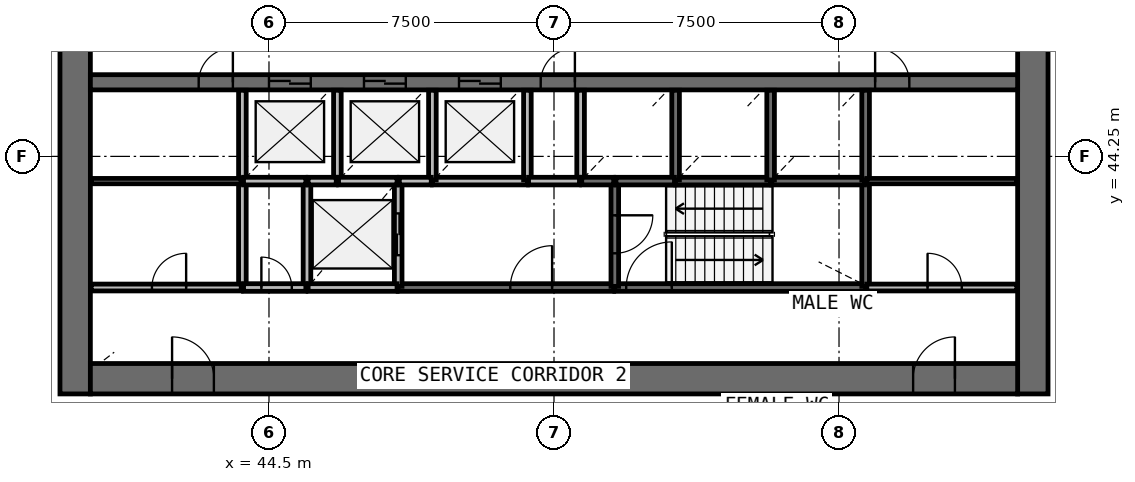
"""IFC4 building model, lengths in metres.
Left out: names, types, materials, properties, quantities, classifications, styles, units other than length and angle.
Written with IfcOpenShell. Run it as: python <this file> out.ifc"""

import sys

from ifc_helpers import new_model, si_unit, direction, frame, frame_2d, origin, place, context, subcontext, project, spatial, rectangle, extrude, source, transform, mapped, element, fill, save


model = new_model("IFC4")
c1 = context("Model", 3, precision=1e-05, world=origin(), true_north=direction((0.0, 1.0)))
c2 = subcontext(c1, "Body", "Model", "MODEL_VIEW")
j1 = project(units=[si_unit("LENGTHUNIT", "METRE"), si_unit("PLANEANGLEUNIT", "RADIAN")], contexts=[c1])
p1 = place(None, origin())
s1 = spatial("IfcSite", under=j1, at=p1, CompositionType="ELEMENT")
p2 = place(p1, origin())
s2 = spatial("IfcBuilding", under=s1, at=p2, CompositionType="ELEMENT")
p3 = place(p2, frame((0.0, 0.0, 108.5)))
s3 = spatial("IfcBuildingStorey", under=s2, at=p3, CompositionType="ELEMENT", Elevation=108.5)
p4 = place(p3, frame((64.6, 38.0, 0.0), z_axis=(0.0, 0.0, 1.0), x_axis=(0.0, 1.0, 0.0)))
e1 = element("IfcWall", 1, at=p4, inside=s3, PredefinedType="SHEAR", context=c2, shape_type="SweptSolid", body=[
    extrude(rectangle(XDim=20.0, YDim=0.8, at=frame_2d((10.0, 0.0))), origin(), (0.0, 0.0, 1.0), 4.1),
])
p5 = place(p4, frame((9.1, 0.0, 0.0)))
e2 = element("IfcOpeningElement", 2, at=p5, cuts=e1, PredefinedType="OPENING", context=c2, shape_type="SweptSolid", body=[
    extrude(rectangle(XDim=1.8, YDim=2.1, at=frame_2d((0.9, 1.05))), frame((0.0, 0.41, 0.0), z_axis=(0.0, -1.0, 0.0), x_axis=(1.0, 0.0, 0.0)), (0.0, 0.0, 1.0), 0.82),
])
p6 = place(p3, frame((39.4, 58.0, 0.0), z_axis=(0.0, 0.0, 1.0), x_axis=(0.0, -1.0, 0.0)))
e3 = element("IfcWall", 3, at=p6, inside=s3, PredefinedType="SHEAR", context=c2, shape_type="SweptSolid", body=[
    extrude(rectangle(XDim=20.0, YDim=0.8, at=frame_2d((10.0, 0.0))), origin(), (0.0, 0.0, 1.0), 4.1),
])
p7 = place(p6, frame((9.1, 0.0, 0.0)))
e4 = element("IfcOpeningElement", 4, at=p7, cuts=e3, PredefinedType="OPENING", context=c2, shape_type="SweptSolid", body=[
    extrude(rectangle(XDim=1.8, YDim=2.1, at=frame_2d((0.9, 1.05))), frame((0.0, 0.41, 0.0), z_axis=(0.0, -1.0, 0.0), x_axis=(1.0, 0.0, 0.0)), (0.0, 0.0, 1.0), 0.82),
])
p8 = place(p3, frame((39.8, 38.4, 0.0), z_axis=(0.0, 0.0, 1.0), x_axis=(1.0, 0.0, 0.0)))
e5 = element("IfcWall", 5, at=p8, inside=s3, PredefinedType="SHEAR", context=c2, shape_type="SweptSolid", body=[
    extrude(rectangle(XDim=24.4, YDim=0.8, at=frame_2d((12.2, 0.0))), origin(), (0.0, 0.0, 1.0), 4.1),
])
p9 = place(p8, frame((21.65, 0.0, 0.0)))
e6 = element("IfcOpeningElement", 6, at=p9, cuts=e5, PredefinedType="OPENING", context=c2, shape_type="SweptSolid", body=[
    extrude(rectangle(XDim=1.1, YDim=2.1, at=frame_2d((0.55, 1.05))), frame((0.0, 0.41, 0.0), z_axis=(0.0, -1.0, 0.0), x_axis=(1.0, 0.0, 0.0)), (0.0, 0.0, 1.0), 0.82),
])
p10 = place(p8, frame((2.15, 0.0, 0.0)))
e7 = element("IfcOpeningElement", 7, at=p10, cuts=e5, PredefinedType="OPENING", context=c2, shape_type="SweptSolid", body=[
    extrude(rectangle(XDim=1.1, YDim=2.1, at=frame_2d((0.55, 1.05))), frame((0.0, 0.41, 0.0), z_axis=(0.0, -1.0, 0.0), x_axis=(1.0, 0.0, 0.0)), (0.0, 0.0, 1.0), 0.82),
])
p11 = place(p3, frame((39.8, 46.2, 0.0), z_axis=(0.0, 0.0, 1.0), x_axis=(1.0, 0.0, 0.0)))
e8 = element("IfcWall", 8, at=p11, inside=s3, PredefinedType="SHEAR", context=c2, shape_type="SweptSolid", body=[
    extrude(rectangle(XDim=24.4, YDim=0.4, at=frame_2d((12.2, 0.0))), origin(), (0.0, 0.0, 1.0), 4.1),
])
p12 = place(p11, frame((4.7, 0.0, 0.0)))
e9 = element("IfcOpeningElement", 9, at=p12, cuts=e8, PredefinedType="OPENING", context=c2, shape_type="SweptSolid", body=[
    extrude(rectangle(XDim=1.1, YDim=2.1, at=frame_2d((0.55, 1.05))), frame((0.0, 0.21, 0.0), z_axis=(0.0, -1.0, 0.0), x_axis=(1.0, 0.0, 0.0)), (0.0, 0.0, 1.0), 0.42),
])
p13 = place(p11, frame((7.2, 0.0, 0.0)))
e10 = element("IfcOpeningElement", 10, at=p13, cuts=e8, PredefinedType="OPENING", context=c2, shape_type="SweptSolid", body=[
    extrude(rectangle(XDim=1.1, YDim=2.1, at=frame_2d((0.55, 1.05))), frame((0.0, 0.21, 0.0), z_axis=(0.0, -1.0, 0.0), x_axis=(1.0, 0.0, 0.0)), (0.0, 0.0, 1.0), 0.42),
])
p14 = place(p11, frame((9.7, 0.0, 0.0)))
e11 = element("IfcOpeningElement", 11, at=p14, cuts=e8, PredefinedType="OPENING", context=c2, shape_type="SweptSolid", body=[
    extrude(rectangle(XDim=1.1, YDim=2.1, at=frame_2d((0.55, 1.05))), frame((0.0, 0.21, 0.0), z_axis=(0.0, -1.0, 0.0), x_axis=(1.0, 0.0, 0.0)), (0.0, 0.0, 1.0), 0.42),
])
p15 = place(p11, frame((20.65, 0.0, 0.0)))
e12 = element("IfcOpeningElement", 12, at=p15, cuts=e8, PredefinedType="OPENING", context=c2, shape_type="SweptSolid", body=[
    extrude(rectangle(XDim=0.9, YDim=2.1, at=frame_2d((0.45, 1.05))), frame((0.0, 0.21, 0.0), z_axis=(0.0, -1.0, 0.0), x_axis=(1.0, 0.0, 0.0)), (0.0, 0.0, 1.0), 0.42),
])
p16 = place(p11, frame((2.85, 0.0, 0.0)))
e13 = element("IfcOpeningElement", 13, at=p16, cuts=e8, PredefinedType="OPENING", context=c2, shape_type="SweptSolid", body=[
    extrude(rectangle(XDim=0.9, YDim=2.1, at=frame_2d((0.45, 1.05))), frame((0.0, 0.21, 0.0), z_axis=(0.0, -1.0, 0.0), x_axis=(1.0, 0.0, 0.0)), (0.0, 0.0, 1.0), 0.42),
])
p17 = place(p11, frame((11.85, 0.0, 0.0)))
e14 = element("IfcOpeningElement", 14, at=p17, cuts=e8, PredefinedType="OPENING", context=c2, shape_type="SweptSolid", body=[
    extrude(rectangle(XDim=0.9, YDim=2.1, at=frame_2d((0.45, 1.05))), frame((0.0, 0.21, 0.0), z_axis=(0.0, -1.0, 0.0), x_axis=(1.0, 0.0, 0.0)), (0.0, 0.0, 1.0), 0.42),
])
p18 = place(p3, frame((53.6, 40.8, 0.0), z_axis=(0.0, 0.0, 1.0), x_axis=(1.0, 0.0, 0.0)))
e15 = element("IfcWall", 15, at=p18, inside=s3, PredefinedType="SOLIDWALL", context=c2, shape_type="SweptSolid", body=[
    extrude(rectangle(XDim=6.6, YDim=0.2, at=frame_2d((3.3, 0.0))), origin(), (0.0, 0.0, 1.0), 3.7),
])
p19 = place(p18, frame((0.3, 0.0, 0.0)))
e16 = element("IfcOpeningElement", 16, at=p19, cuts=e15, PredefinedType="OPENING", context=c2, shape_type="SweptSolid", body=[
    extrude(rectangle(XDim=1.2, YDim=2.1, at=frame_2d((0.6, 1.05))), frame((0.0, 0.11, 0.0), z_axis=(0.0, -1.0, 0.0), x_axis=(1.0, 0.0, 0.0)), (0.0, 0.0, 1.0), 0.22),
])
p20 = place(p3, frame((47.9, 40.8, 0.0), z_axis=(0.0, 0.0, 1.0), x_axis=(1.0, 0.0, 0.0)))
e17 = element("IfcWall", 17, at=p20, inside=s3, PredefinedType="SOLIDWALL", context=c2, shape_type="SweptSolid", body=[
    extrude(rectangle(XDim=5.67, YDim=0.2, at=frame_2d((2.835, 0.0))), origin(), (0.0, 0.0, 1.0), 3.7),
])
p21 = place(p20, frame((2.95, 0.0, 0.0)))
e18 = element("IfcOpeningElement", 18, at=p21, cuts=e17, PredefinedType="OPENING", context=c2, shape_type="SweptSolid", body=[
    extrude(rectangle(XDim=1.1, YDim=2.1, at=frame_2d((0.55, 1.05))), frame((0.0, 0.11, 0.0), z_axis=(0.0, -1.0, 0.0), x_axis=(1.0, 0.0, 0.0)), (0.0, 0.0, 1.0), 0.22),
])
for number, where, z_axis, x_axis in (
    (19, (43.8, 43.6, 0.0), (0.0, 0.0, 1.0), (0.0, -1.0, 0.0)),
    (20, (45.5, 43.6, 0.0), (0.0, 0.0, 1.0), (0.0, -1.0, 0.0)),
):
    element("IfcWall", number, at=place(p3, frame(where, z_axis=z_axis, x_axis=x_axis)), inside=s3, PredefinedType="SOLIDWALL", context=c2, shape_type="SweptSolid", body=[
        extrude(rectangle(XDim=2.8, YDim=0.2, at=frame_2d((1.4, 0.0))), origin(), (0.0, 0.0, 1.0), 3.7),
    ])
p22 = place(p3, frame((47.9, 40.83, 0.0), z_axis=(0.0, 0.0, 1.0), x_axis=(0.0, 1.0, 0.0)))
e21 = element("IfcWall", 21, at=p22, inside=s3, PredefinedType="SOLIDWALL", context=c2, shape_type="SweptSolid", body=[
    extrude(rectangle(XDim=2.77, YDim=0.2, at=frame_2d((1.385, 0.0))), origin(), (0.0, 0.0, 1.0), 3.7),
])
p23 = place(p22, frame((0.82, 0.0, 0.0)))
e22 = element("IfcOpeningElement", 22, at=p23, cuts=e21, PredefinedType="OPENING", context=c2, shape_type="SweptSolid", body=[
    extrude(rectangle(XDim=1.1, YDim=2.1, at=frame_2d((0.55, 1.05))), frame((0.0, 0.11, 0.0), z_axis=(0.0, -1.0, 0.0), x_axis=(1.0, 0.0, 0.0)), (0.0, 0.0, 1.0), 0.22),
])
p24 = place(p3, frame((60.2, 40.83, 0.0), z_axis=(0.0, 0.0, 1.0), x_axis=(0.0, 1.0, 0.0)))
e23 = element("IfcWall", 23, at=p24, inside=s3, PredefinedType="SOLIDWALL", context=c2, shape_type="SweptSolid", body=[
    extrude(rectangle(XDim=2.77, YDim=0.2, at=frame_2d((1.385, 0.0))), origin(), (0.0, 0.0, 1.0), 3.7),
])
p25 = place(p3, frame((53.6, 43.6, 0.0), z_axis=(0.0, 0.0, 1.0), x_axis=(0.0, -1.0, 0.0)))
e24 = element("IfcWall", 24, at=p25, inside=s3, PredefinedType="SOLIDWALL", context=c2, shape_type="SweptSolid", body=[
    extrude(rectangle(XDim=2.77, YDim=0.2, at=frame_2d((1.385, 0.0))), origin(), (0.0, 0.0, 1.0), 3.7),
])
p26 = place(p25, frame((0.9, 0.0, 0.0)))
e25 = element("IfcOpeningElement", 25, at=p26, cuts=e24, PredefinedType="OPENING", context=c2, shape_type="SweptSolid", body=[
    extrude(rectangle(XDim=1.0, YDim=2.1, at=frame_2d((0.5, 1.05))), frame((0.0, 0.11, 0.0), z_axis=(0.0, -1.0, 0.0), x_axis=(1.0, 0.0, 0.0)), (0.0, 0.0, 1.0), 0.22),
])
for number, where, z_axis, x_axis in (
    (26, (48.8, 43.6, 0.0), (0.0, 0.0, 1.0), (1.0, 0.0, 0.0)),
    (27, (55.2, 43.6, 0.0), (0.0, 0.0, 1.0), (1.0, 0.0, 0.0)),
):
    element("IfcWall", number, at=place(p3, frame(where, z_axis=z_axis, x_axis=x_axis)), inside=s3, PredefinedType="SOLIDWALL", context=c2, shape_type="SweptSolid", body=[
        extrude(rectangle(XDim=2.5, YDim=0.2, at=frame_2d((1.25, 0.0))), origin(), (0.0, 0.0, 1.0), 3.7),
    ])
p27 = place(p3, frame((57.73, 43.6, 0.0), z_axis=(0.0, 0.0, 1.0), x_axis=(1.0, 0.0, 0.0)))
e28 = element("IfcWall", 28, at=p27, inside=s3, PredefinedType="SOLIDWALL", context=c2, shape_type="SweptSolid", body=[
    extrude(rectangle(XDim=2.44, YDim=0.2, at=frame_2d((1.22, 0.0))), origin(), (0.0, 0.0, 1.0), 3.7),
])
p28 = place(p3, frame((45.53, 40.8, 0.0), z_axis=(0.0, 0.0, 1.0), x_axis=(1.0, 0.0, 0.0)))
e29 = element("IfcWall", 29, at=p28, inside=s3, PredefinedType="SOLIDWALL", context=c2, shape_type="SweptSolid", body=[
    extrude(rectangle(XDim=2.34, YDim=0.2, at=frame_2d((1.17, 0.0))), origin(), (0.0, 0.0, 1.0), 3.7),
])
p29 = place(p3, frame((43.8, 45.99, 0.0), z_axis=(0.0, 0.0, 1.0), x_axis=(0.0, -1.0, 0.0)))
e30 = element("IfcWall", 30, at=p29, inside=s3, PredefinedType="SOLIDWALL", context=c2, shape_type="SweptSolid", body=[
    extrude(rectangle(XDim=2.36, YDim=0.2, at=frame_2d((1.18, 0.0))), origin(), (0.0, 0.0, 1.0), 3.7),
])
p30 = place(p3, frame((46.3, 43.6, 0.0), z_axis=(0.0, 0.0, 1.0), x_axis=(0.0, 1.0, 0.0)))
e31 = element("IfcWall", 31, at=p30, inside=s3, PredefinedType="SOLIDWALL", context=c2, shape_type="SweptSolid", body=[
    extrude(rectangle(XDim=2.39, YDim=0.2, at=frame_2d((1.195, 0.0))), origin(), (0.0, 0.0, 1.0), 3.7),
])
for number, where, z_axis, x_axis in (
    (32, (48.8, 43.63, 0.0), (0.0, 0.0, 1.0), (0.0, 1.0, 0.0)),
    (33, (51.3, 43.63, 0.0), (0.0, 0.0, 1.0), (0.0, 1.0, 0.0)),
):
    element("IfcWall", number, at=place(p3, frame(where, z_axis=z_axis, x_axis=x_axis)), inside=s3, PredefinedType="SOLIDWALL", context=c2, shape_type="SweptSolid", body=[
        extrude(rectangle(XDim=2.36, YDim=0.2, at=frame_2d((1.18, 0.0))), origin(), (0.0, 0.0, 1.0), 3.7),
    ])
p31 = place(p3, frame((52.7, 45.99, 0.0), z_axis=(0.0, 0.0, 1.0), x_axis=(0.0, -1.0, 0.0)))
e34 = element("IfcWall", 34, at=p31, inside=s3, PredefinedType="SOLIDWALL", context=c2, shape_type="SweptSolid", body=[
    extrude(rectangle(XDim=2.39, YDim=0.2, at=frame_2d((1.195, 0.0))), origin(), (0.0, 0.0, 1.0), 3.7),
])
for number, where, z_axis, x_axis in (
    (35, (55.2, 43.63, 0.0), (0.0, 0.0, 1.0), (0.0, 1.0, 0.0)),
    (36, (57.7, 43.63, 0.0), (0.0, 0.0, 1.0), (0.0, 1.0, 0.0)),
    (37, (60.2, 43.63, 0.0), (0.0, 0.0, 1.0), (0.0, 1.0, 0.0)),
):
    element("IfcWall", number, at=place(p3, frame(where, z_axis=z_axis, x_axis=x_axis)), inside=s3, PredefinedType="SOLIDWALL", context=c2, shape_type="SweptSolid", body=[
        extrude(rectangle(XDim=2.36, YDim=0.2, at=frame_2d((1.18, 0.0))), origin(), (0.0, 0.0, 1.0), 3.7),
    ])
p32 = place(p3, frame((43.83, 43.6, 0.0), z_axis=(0.0, 0.0, 1.0), x_axis=(1.0, 0.0, 0.0)))
e38 = element("IfcWall", 38, at=p32, inside=s3, PredefinedType="SOLIDWALL", context=c2, shape_type="SweptSolid", body=[
    extrude(rectangle(XDim=1.64, YDim=0.2, at=frame_2d((0.82, 0.0))), origin(), (0.0, 0.0, 1.0), 3.7),
])
p33 = place(p3, frame((43.83, 40.8, 0.0), z_axis=(0.0, 0.0, 1.0), x_axis=(1.0, 0.0, 0.0)))
e39 = element("IfcWall", 39, at=p33, inside=s3, PredefinedType="SOLIDWALL", context=c2, shape_type="SweptSolid", body=[
    extrude(rectangle(XDim=1.64, YDim=0.2, at=frame_2d((0.82, 0.0))), origin(), (0.0, 0.0, 1.0), 3.7),
])
p34 = place(p33, frame((0.47, 0.0, 0.0)))
e40 = element("IfcOpeningElement", 40, at=p34, cuts=e39, PredefinedType="OPENING", context=c2, shape_type="SweptSolid", body=[
    extrude(rectangle(XDim=0.8, YDim=2.1, at=frame_2d((0.4, 1.05))), frame((0.0, 0.11, 0.0), z_axis=(0.0, -1.0, 0.0), x_axis=(1.0, 0.0, 0.0)), (0.0, 0.0, 1.0), 0.22),
])
for number, where, z_axis, x_axis in (
    (41, (46.33, 43.6, 0.0), (0.0, 0.0, 1.0), (1.0, 0.0, 0.0)),
    (42, (53.63, 43.6, 0.0), (0.0, 0.0, 1.0), (1.0, 0.0, 0.0)),
):
    element("IfcWall", number, at=place(p3, frame(where, z_axis=z_axis, x_axis=x_axis)), inside=s3, PredefinedType="SOLIDWALL", context=c2, shape_type="SweptSolid", body=[
        extrude(rectangle(XDim=1.54, YDim=0.2, at=frame_2d((0.77, 0.0))), origin(), (0.0, 0.0, 1.0), 3.7),
    ])
p35 = place(p3, frame((52.67, 43.6, 0.0), z_axis=(0.0, 0.0, 1.0), x_axis=(-1.0, 0.0, 0.0)))
e43 = element("IfcWall", 43, at=p35, inside=s3, PredefinedType="SOLIDWALL", context=c2, shape_type="SweptSolid", body=[
    extrude(rectangle(XDim=1.34, YDim=0.2, at=frame_2d((0.67, 0.0))), origin(), (0.0, 0.0, 1.0), 3.7),
])
for number, where, z_axis, x_axis in (
    (44, (47.93, 43.6, 0.0), (0.0, 0.0, 1.0), (1.0, 0.0, 0.0)),
    (45, (52.73, 43.6, 0.0), (0.0, 0.0, 1.0), (1.0, 0.0, 0.0)),
):
    element("IfcWall", number, at=place(p3, frame(where, z_axis=z_axis, x_axis=x_axis)), inside=s3, PredefinedType="SOLIDWALL", context=c2, shape_type="SweptSolid", body=[
        extrude(rectangle(XDim=0.84, YDim=0.2, at=frame_2d((0.42, 0.0))), origin(), (0.0, 0.0, 1.0), 3.7),
    ])
p36 = place(p3, frame((45.53, 43.6, 0.0), z_axis=(0.0, 0.0, 1.0), x_axis=(1.0, 0.0, 0.0)))
e46 = element("IfcWall", 46, at=p36, inside=s3, PredefinedType="SOLIDWALL", context=c2, shape_type="SweptSolid", body=[
    extrude(rectangle(XDim=0.74, YDim=0.2, at=frame_2d((0.37, 0.0))), origin(), (0.0, 0.0, 1.0), 3.7),
])
p37 = place(p3, frame((60.23, 40.8, 0.0), z_axis=(0.0, 0.0, 1.0), x_axis=(1.0, 0.0, 0.0)))
e47 = element("IfcWall", 47, at=p37, inside=s3, PredefinedType="PARTITIONING", context=c2, shape_type="SweptSolid", body=[
    extrude(rectangle(XDim=3.95, YDim=0.18, at=frame_2d((1.975, 0.0))), origin(), (0.0, 0.0, 1.0), 3.7),
])
p38 = place(p37, frame((1.6, 0.0, 0.0)))
e48 = element("IfcOpeningElement", 48, at=p38, cuts=e47, PredefinedType="OPENING", context=c2, shape_type="SweptSolid", body=[
    extrude(rectangle(XDim=0.9, YDim=2.1, at=frame_2d((0.45, 1.05))), frame((0.0, 0.1, 0.0), z_axis=(0.0, -1.0, 0.0), x_axis=(1.0, 0.0, 0.0)), (0.0, 0.0, 1.0), 0.2),
])
p39 = place(p3, frame((39.82, 40.8, 0.0), z_axis=(0.0, 0.0, 1.0), x_axis=(1.0, 0.0, 0.0)))
e49 = element("IfcWall", 49, at=p39, inside=s3, PredefinedType="PARTITIONING", context=c2, shape_type="SweptSolid", body=[
    extrude(rectangle(XDim=3.95, YDim=0.18, at=frame_2d((1.975, 0.0))), origin(), (0.0, 0.0, 1.0), 3.7),
])
p40 = place(p39, frame((1.6, 0.0, 0.0)))
e50 = element("IfcOpeningElement", 50, at=p40, cuts=e49, PredefinedType="OPENING", context=c2, shape_type="SweptSolid", body=[
    extrude(rectangle(XDim=0.9, YDim=2.1, at=frame_2d((0.45, 1.05))), frame((0.0, 0.1, 0.0), z_axis=(0.0, -1.0, 0.0), x_axis=(1.0, 0.0, 0.0)), (0.0, 0.0, 1.0), 0.2),
])
for number, where, z_axis, x_axis in (
    (51, (60.23, 43.6, 0.0), (0.0, 0.0, 1.0), (1.0, 0.0, 0.0)),
    (52, (43.77, 43.6, 0.0), (0.0, 0.0, 1.0), (-1.0, 0.0, 0.0)),
):
    element("IfcWall", number, at=place(p3, frame(where, z_axis=z_axis, x_axis=x_axis)), inside=s3, PredefinedType="PARTITIONING", context=c2, shape_type="SweptSolid", body=[
        extrude(rectangle(XDim=3.95, YDim=0.14, at=frame_2d((1.975, 0.0))), origin(), (0.0, 0.0, 1.0), 2.9),
    ])
m1 = source(origin(), c2, "Body", "SweptSolid", [
    extrude(rectangle(XDim=1.1, YDim=2.1, at=frame_2d((0.55, 1.05))), frame((0.0, 0.025, 0.0), z_axis=(0.0, -1.0, 0.0), x_axis=(1.0, 0.0, 0.0)), (0.0, 0.0, 1.0), 0.05),
])
p41 = place(p12, origin())
e53 = element("IfcDoor", 53, at=p41, inside=s3, OperationType="DOUBLE_DOOR_SLIDING", PredefinedType="USERDEFINED", context=c2, shape_type="MappedRepresentation", body=[
    mapped(m1, transform((0.0, 0.0, 0.0), scale=1.0)),
])
fill(e9, e53)
p42 = place(p13, origin())
e54 = element("IfcDoor", 54, at=p42, inside=s3, OperationType="DOUBLE_DOOR_SLIDING", PredefinedType="USERDEFINED", context=c2, shape_type="MappedRepresentation", body=[
    mapped(m1, transform((0.0, 0.0, 0.0), scale=1.0)),
])
fill(e10, e54)
p43 = place(p14, origin())
e55 = element("IfcDoor", 55, at=p43, inside=s3, OperationType="DOUBLE_DOOR_SLIDING", PredefinedType="USERDEFINED", context=c2, shape_type="MappedRepresentation", body=[
    mapped(m1, transform((0.0, 0.0, 0.0), scale=1.0)),
])
fill(e11, e55)
p44 = place(p23, origin())
e56 = element("IfcDoor", 56, at=p44, inside=s3, OperationType="DOUBLE_DOOR_SLIDING", PredefinedType="USERDEFINED", context=c2, shape_type="MappedRepresentation", body=[
    mapped(m1, transform((0.0, 0.0, 0.0), scale=1.0)),
])
fill(e22, e56)
m2 = source(origin(), c2, "Body", "SweptSolid", [
    extrude(rectangle(XDim=1.2, YDim=2.1, at=frame_2d((0.6, 1.05))), frame((0.0, 0.025, 0.0), z_axis=(0.0, -1.0, 0.0), x_axis=(1.0, 0.0, 0.0)), (0.0, 0.0, 1.0), 0.05),
])
p45 = place(p19, origin())
e57 = element("IfcDoor", 57, at=p45, inside=s3, OperationType="SINGLE_SWING_RIGHT", PredefinedType="DOOR", context=c2, shape_type="MappedRepresentation", body=[
    mapped(m2, transform((0.0, 0.0, 0.0), scale=1.0)),
])
fill(e16, e57)
m3 = source(origin(), c2, "Body", "SweptSolid", [
    extrude(rectangle(XDim=1.0, YDim=2.1, at=frame_2d((0.5, 1.05))), frame((0.0, 0.025, 0.0), z_axis=(0.0, -1.0, 0.0), x_axis=(1.0, 0.0, 0.0)), (0.0, 0.0, 1.0), 0.05),
])
p46 = place(p26, origin())
e58 = element("IfcDoor", 58, at=p46, inside=s3, OperationType="SINGLE_SWING_LEFT", PredefinedType="DOOR", context=c2, shape_type="MappedRepresentation", body=[
    mapped(m3, transform((0.0, 0.0, 0.0), scale=1.0)),
])
fill(e25, e58)
m4 = source(origin(), c2, "Body", "SweptSolid", [
    extrude(rectangle(XDim=1.1, YDim=2.1, at=frame_2d((0.55, 1.05))), frame((0.0, 0.025, 0.0), z_axis=(0.0, -1.0, 0.0), x_axis=(1.0, 0.0, 0.0)), (0.0, 0.0, 1.0), 0.05),
])
p47 = place(p21, origin())
e59 = element("IfcDoor", 59, at=p47, inside=s3, OperationType="SINGLE_SWING_RIGHT", PredefinedType="DOOR", context=c2, shape_type="MappedRepresentation", body=[
    mapped(m4, transform((0.0, 0.0, 0.0), scale=1.0)),
])
fill(e18, e59)
m5 = source(origin(), c2, "Body", "SweptSolid", [
    extrude(rectangle(XDim=0.8, YDim=2.1, at=frame_2d((0.4, 1.05))), frame((0.0, 0.025, 0.0), z_axis=(0.0, -1.0, 0.0), x_axis=(1.0, 0.0, 0.0)), (0.0, 0.0, 1.0), 0.05),
])
p48 = place(p34, origin())
e60 = element("IfcDoor", 60, at=p48, inside=s3, OperationType="SINGLE_SWING_LEFT", PredefinedType="DOOR", context=c2, shape_type="MappedRepresentation", body=[
    mapped(m5, transform((0.0, 0.0, 0.0), scale=1.0)),
])
fill(e40, e60)
m6 = source(origin(), c2, "Body", "SweptSolid", [
    extrude(rectangle(XDim=1.1, YDim=2.1, at=frame_2d((0.55, 1.05))), frame((0.0, 0.025, 0.0), z_axis=(0.0, -1.0, 0.0), x_axis=(1.0, 0.0, 0.0)), (0.0, 0.0, 1.0), 0.05),
])
p49 = place(p9, origin())
e61 = element("IfcDoor", 61, at=p49, inside=s3, OperationType="SINGLE_SWING_RIGHT", PredefinedType="DOOR", context=c2, shape_type="MappedRepresentation", body=[
    mapped(m6, transform((0.0, 0.0, 0.0), scale=1.0)),
])
fill(e6, e61)
p50 = place(p10, origin())
e62 = element("IfcDoor", 62, at=p50, inside=s3, OperationType="SINGLE_SWING_LEFT", PredefinedType="DOOR", context=c2, shape_type="MappedRepresentation", body=[
    mapped(m6, transform((0.0, 0.0, 0.0), scale=1.0)),
])
fill(e7, e62)
m7 = source(origin(), c2, "Body", "SweptSolid", [
    extrude(rectangle(XDim=0.9, YDim=2.1, at=frame_2d((0.45, 1.05))), frame((0.0, 0.025, 0.0), z_axis=(0.0, -1.0, 0.0), x_axis=(1.0, 0.0, 0.0)), (0.0, 0.0, 1.0), 0.05),
])
p51 = place(p40, origin())
e63 = element("IfcDoor", 63, at=p51, inside=s3, OperationType="SINGLE_SWING_RIGHT", PredefinedType="DOOR", context=c2, shape_type="MappedRepresentation", body=[
    mapped(m7, transform((0.0, 0.0, 0.0), scale=1.0)),
])
fill(e50, e63)
p52 = place(p15, origin())
e64 = element("IfcDoor", 64, at=p52, inside=s3, OperationType="SINGLE_SWING_LEFT", PredefinedType="DOOR", context=c2, shape_type="MappedRepresentation", body=[
    mapped(m7, transform((0.0, 0.0, 0.0), scale=1.0)),
])
fill(e12, e64)
p53 = place(p38, origin())
e65 = element("IfcDoor", 65, at=p53, inside=s3, OperationType="SINGLE_SWING_LEFT", PredefinedType="DOOR", context=c2, shape_type="MappedRepresentation", body=[
    mapped(m7, transform((0.0, 0.0, 0.0), scale=1.0)),
])
fill(e48, e65)
p54 = place(p16, origin())
e66 = element("IfcDoor", 66, at=p54, inside=s3, OperationType="SINGLE_SWING_RIGHT", PredefinedType="DOOR", context=c2, shape_type="MappedRepresentation", body=[
    mapped(m7, transform((0.0, 0.0, 0.0), scale=1.0)),
])
fill(e13, e66)
p55 = place(p17, origin())
e67 = element("IfcDoor", 67, at=p55, inside=s3, OperationType="SINGLE_SWING_RIGHT", PredefinedType="DOOR", context=c2, shape_type="MappedRepresentation", body=[
    mapped(m7, transform((0.0, 0.0, 0.0), scale=1.0)),
])
fill(e14, e67)
save(model, sys.argv[1])
